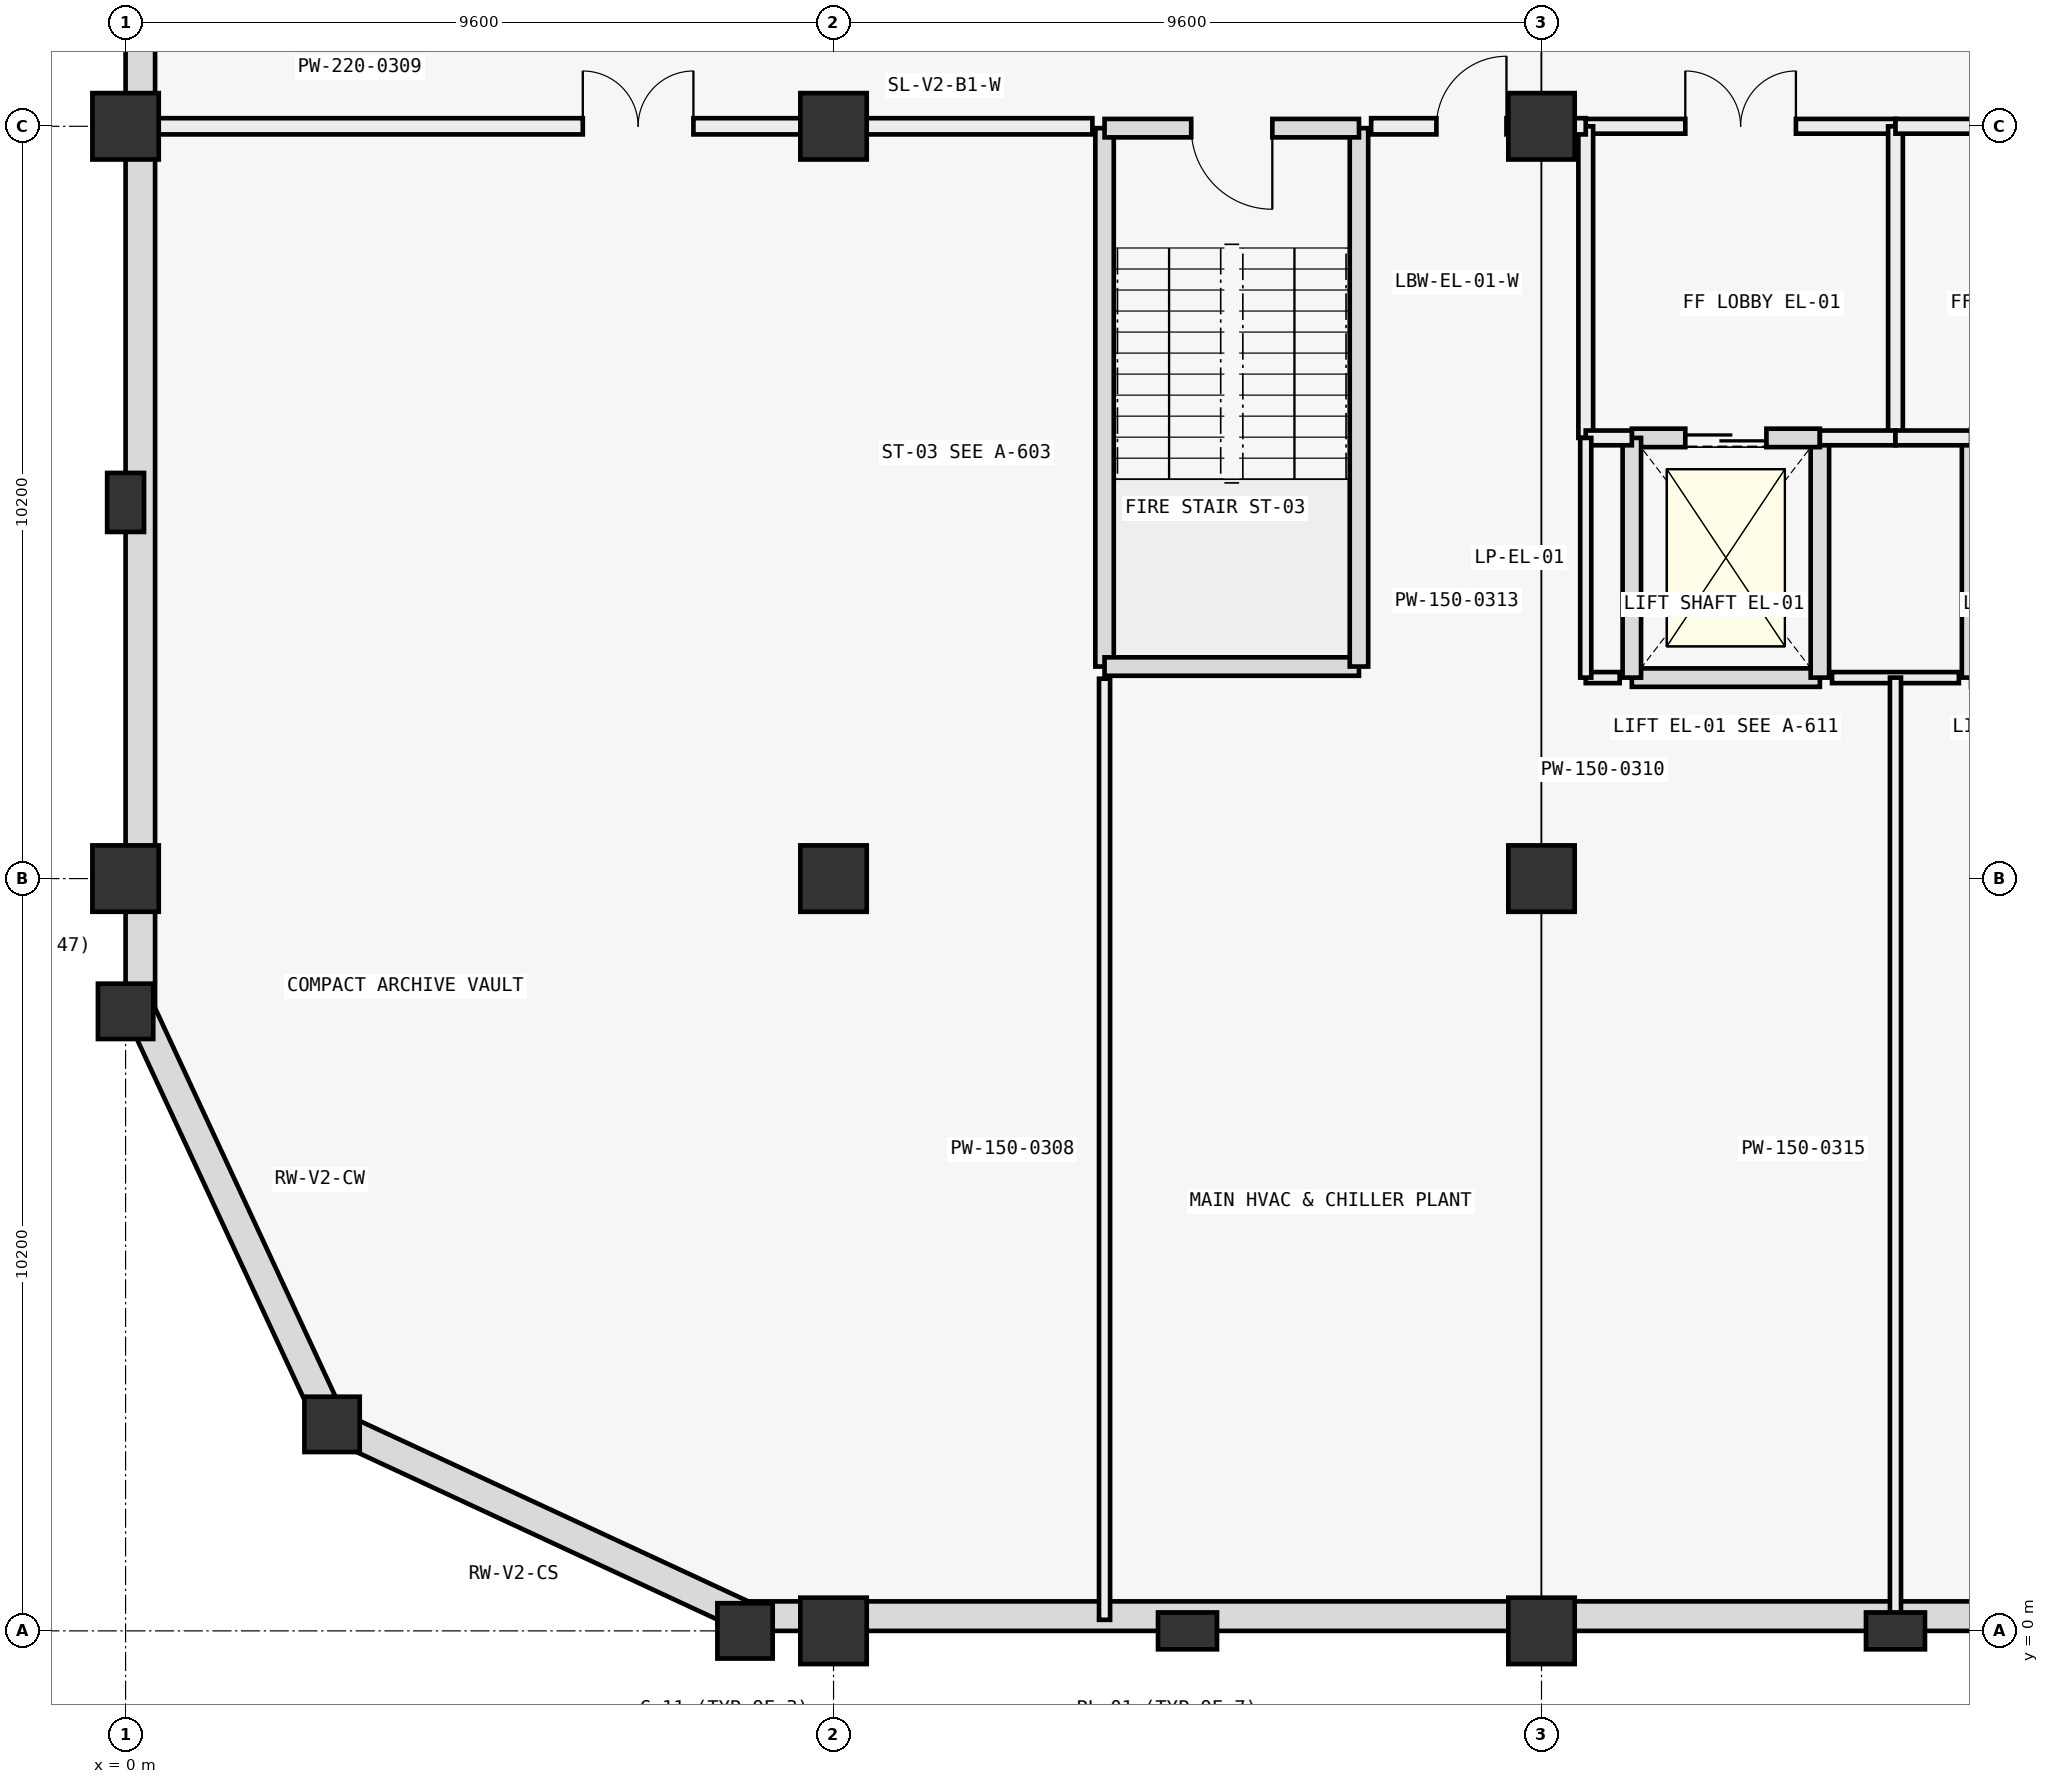
"""IFC4 building model, lengths in metres.
Left out: names, types, materials, properties, quantities, classifications, styles, units other than length and angle.
Written with IfcOpenShell. Run it as: python <this file> out.ifc"""

import sys

from ifc_helpers import new_model, si_unit, direction, frame, frame_2d, origin, origin_2d, place, context, subcontext, project, spatial, rectangle, circle, extrude, element, fill, save


model = new_model("IFC4")
c1 = context("Model", 3, precision=1e-05, world=origin(), true_north=direction((0.0, 1.0)))
c2 = subcontext(c1, "Body", "Model", "MODEL_VIEW")
j1 = project(units=[si_unit("LENGTHUNIT", "METRE"), si_unit("PLANEANGLEUNIT", "RADIAN")], contexts=[c1])
p1 = place(None, origin())
s1 = spatial("IfcSite", under=j1, at=p1, CompositionType="ELEMENT")
p2 = place(p1, origin())
s2 = spatial("IfcBuilding", under=s1, at=p2, CompositionType="ELEMENT")
p3 = place(p2, frame((0.0, 0.0, -4.2)))
s3 = spatial("IfcBuildingStorey", under=s2, at=p3, CompositionType="ELEMENT", Elevation=-4.2)
for number, where, z_axis, x_axis in (
    (1, (0.0, 10.2, 0.0), (0.0, 0.0, 1.0), (1.0, 0.0, 0.0)),
    (2, (0.0, 20.4, 0.0), (0.0, 0.0, 1.0), (1.0, 0.0, 0.0)),
    (3, (9.6, 0.0, 0.0), (0.0, 0.0, 1.0), (1.0, 0.0, 0.0)),
    (4, (9.6, 10.2, 0.0), (0.0, 0.0, 1.0), (1.0, 0.0, 0.0)),
    (5, (9.6, 20.4, 0.0), (0.0, 0.0, 1.0), (1.0, 0.0, 0.0)),
    (6, (19.2, 0.0, 0.0), (0.0, 0.0, 1.0), (1.0, 0.0, 0.0)),
    (7, (19.2, 10.2, 0.0), (0.0, 0.0, 1.0), (1.0, 0.0, 0.0)),
    (8, (19.2, 20.4, 0.0), (0.0, 0.0, 1.0), (1.0, 0.0, 0.0)),
):
    element("IfcColumn", number, at=place(p3, frame(where, z_axis=z_axis, x_axis=x_axis)), inside=s3, PredefinedType="COLUMN", context=c2, shape_type="SweptSolid", body=[
        extrude(rectangle(XDim=0.9, YDim=0.9, at=origin_2d()), origin(), (0.0, 0.0, 1.0), 4.2),
    ])
for number, where, z_axis, x_axis in (
    (9, (8.4, 0.0, 0.0), (0.0, 0.0, 1.0), (0.0, 1.0, 0.0)),
    (10, (2.8, 2.8, 0.0), (0.0, 0.0, 1.0), (0.707, 0.707, 0.0)),
    (11, (0.0, 8.4, 0.0), (0.0, 0.0, 1.0), (1.0, 0.0, 0.0)),
):
    element("IfcColumn", number, at=place(p3, frame(where, z_axis=z_axis, x_axis=x_axis)), inside=s3, PredefinedType="COLUMN", context=c2, shape_type="SweptSolid", body=[
        extrude(circle(Radius=0.375, at=origin_2d()), origin(), (0.0, 0.0, 1.0), 4.2),
    ])
for number, where, z_axis, x_axis in (
    (12, (14.4, 0.0, 0.0), (0.0, 0.0, 1.0), (0.0, 1.0, 0.0)),
    (13, (24.0, 0.0, 0.0), (0.0, 0.0, 1.0), (0.0, 1.0, 0.0)),
    (14, (0.0, 15.3, 0.0), (0.0, 0.0, 1.0), (1.0, 0.0, 0.0)),
):
    element("IfcColumn", number, at=place(p3, frame(where, z_axis=z_axis, x_axis=x_axis)), inside=s3, PredefinedType="PILASTER", context=c2, shape_type="SweptSolid", body=[
        extrude(rectangle(XDim=0.5, YDim=0.8, at=origin_2d()), origin(), (0.0, 0.0, 1.0), 4.2),
    ])
p4 = place(p3, frame((8.4, 0.2, 0.0), z_axis=(0.0, 0.0, 1.0), x_axis=(1.0, 0.0, 0.0)))
e15 = element("IfcWall", 15, at=p4, inside=s3, PredefinedType="USERDEFINED", context=c2, shape_type="SweptSolid", body=[
    extrude(rectangle(XDim=39.4, YDim=0.4, at=frame_2d((19.7, 0.0))), origin(), (0.0, 0.0, 1.0), 3.9),
])
for number, where, z_axis, x_axis in (
    (16, (8.4, 0.2, 0.0), (0.0, 0.0, 1.0), (-0.907, 0.421, 0.0)),
    (17, (2.8, 2.8, 0.0), (0.0, 0.0, 1.0), (-0.421, 0.907, 0.0)),
):
    element("IfcWall", number, at=place(p3, frame(where, z_axis=z_axis, x_axis=x_axis)), inside=s3, PredefinedType="USERDEFINED", context=c2, shape_type="SweptSolid", body=[
        extrude(rectangle(XDim=6.174, YDim=0.4, at=frame_2d((3.087, 0.0))), origin(), (0.0, 0.0, 1.0), 3.9),
    ])
p5 = place(p3, frame((0.2, 8.4, 0.0), z_axis=(0.0, 0.0, 1.0), x_axis=(0.0, 1.0, 0.0)))
e18 = element("IfcWall", 18, at=p5, inside=s3, PredefinedType="USERDEFINED", context=c2, shape_type="SweptSolid", body=[
    extrude(rectangle(XDim=32.2, YDim=0.4, at=frame_2d((16.1, 0.0))), origin(), (0.0, 0.0, 1.0), 3.9),
])
p6 = place(p3, frame((13.275, 20.375, 0.0), z_axis=(0.0, 0.0, 1.0), x_axis=(0.0, -1.0, 0.0)))
e19 = element("IfcWall", 19, at=p6, inside=s3, PredefinedType="SOLIDWALL", context=c2, shape_type="SweptSolid", body=[
    extrude(rectangle(XDim=7.3, YDim=0.25, at=frame_2d((3.65, 0.0))), origin(), (0.0, 0.0, 1.0), 3.9),
])
p7 = place(p3, frame((13.275, 13.075, 0.0), z_axis=(0.0, 0.0, 1.0), x_axis=(1.0, 0.0, 0.0)))
e20 = element("IfcWall", 20, at=p7, inside=s3, PredefinedType="SOLIDWALL", context=c2, shape_type="SweptSolid", body=[
    extrude(rectangle(XDim=3.45, YDim=0.25, at=frame_2d((1.725, 0.0))), origin(), (0.0, 0.0, 1.0), 3.9),
])
p8 = place(p3, frame((16.725, 13.075, 0.0), z_axis=(0.0, 0.0, 1.0), x_axis=(0.0, 1.0, 0.0)))
e21 = element("IfcWall", 21, at=p8, inside=s3, PredefinedType="SOLIDWALL", context=c2, shape_type="SweptSolid", body=[
    extrude(rectangle(XDim=7.3, YDim=0.25, at=frame_2d((3.65, 0.0))), origin(), (0.0, 0.0, 1.0), 3.9),
])
p9 = place(p3, frame((16.725, 20.375, 0.0), z_axis=(0.0, 0.0, 1.0), x_axis=(-1.0, 0.0, 0.0)))
e22 = element("IfcWall", 22, at=p9, inside=s3, PredefinedType="SOLIDWALL", context=c2, shape_type="SweptSolid", body=[
    extrude(rectangle(XDim=3.45, YDim=0.25, at=frame_2d((1.725, 0.0))), origin(), (0.0, 0.0, 1.0), 3.9),
])
p10 = place(p9, frame((1.175, 0.0, 0.0)))
e23 = element("IfcOpeningElement", 23, at=p10, cuts=e22, PredefinedType="OPENING", context=c2, shape_type="SweptSolid", body=[
    extrude(rectangle(XDim=1.1, YDim=2.2, at=frame_2d((0.55, 1.1))), frame((0.0, 0.135, 0.0), z_axis=(0.0, -1.0, 0.0), x_axis=(1.0, 0.0, 0.0)), (0.0, 0.0, 1.0), 0.27),
])
p11 = place(p3, frame((20.425, 12.925, -0.15), z_axis=(0.0, 0.0, 1.0), x_axis=(1.0, 0.0, 0.0)))
e24 = element("IfcWall", 24, at=p11, inside=s3, PredefinedType="SOLIDWALL", context=c2, shape_type="SweptSolid", body=[
    extrude(rectangle(XDim=2.55, YDim=0.25, at=frame_2d((1.275, 0.0))), origin(), (0.0, 0.0, 1.0), 4.05),
])
p12 = place(p3, frame((22.975, 12.925, -0.15), z_axis=(0.0, 0.0, 1.0), x_axis=(0.0, 1.0, 0.0)))
e25 = element("IfcWall", 25, at=p12, inside=s3, PredefinedType="SOLIDWALL", context=c2, shape_type="SweptSolid", body=[
    extrude(rectangle(XDim=3.25, YDim=0.25, at=frame_2d((1.625, 0.0))), origin(), (0.0, 0.0, 1.0), 4.05),
])
p13 = place(p3, frame((22.975, 16.175, -0.15), z_axis=(0.0, 0.0, 1.0), x_axis=(-1.0, 0.0, 0.0)))
e26 = element("IfcWall", 26, at=p13, inside=s3, PredefinedType="SOLIDWALL", context=c2, shape_type="SweptSolid", body=[
    extrude(rectangle(XDim=2.55, YDim=0.25, at=frame_2d((1.275, 0.0))), origin(), (0.0, 0.0, 1.0), 4.05),
])
p14 = place(p13, frame((0.725, 0.0, 0.15)))
e27 = element("IfcOpeningElement", 27, at=p14, cuts=e26, PredefinedType="OPENING", context=c2, shape_type="SweptSolid", body=[
    extrude(rectangle(XDim=1.1, YDim=2.1, at=frame_2d((0.55, 1.05))), frame((0.0, 0.135, 0.0), z_axis=(0.0, -1.0, 0.0), x_axis=(1.0, 0.0, 0.0)), (0.0, 0.0, 1.0), 0.27),
])
p15 = place(p3, frame((20.425, 16.175, -0.15), z_axis=(0.0, 0.0, 1.0), x_axis=(0.0, -1.0, 0.0)))
e28 = element("IfcWall", 28, at=p15, inside=s3, PredefinedType="SOLIDWALL", context=c2, shape_type="SweptSolid", body=[
    extrude(rectangle(XDim=3.25, YDim=0.25, at=frame_2d((1.625, 0.0))), origin(), (0.0, 0.0, 1.0), 4.05),
])
p16 = place(p3, frame((19.8, 20.4, 0.0), z_axis=(0.0, 0.0, 1.0), x_axis=(1.0, 0.0, 0.0)))
e29 = element("IfcWall", 29, at=p16, inside=s3, PredefinedType="PARTITIONING", context=c2, shape_type="SweptSolid", body=[
    extrude(rectangle(XDim=4.2, YDim=0.2, at=frame_2d((2.1, 0.0))), origin(), (0.0, 0.0, 1.0), 3.18),
])
p17 = place(p16, frame((1.35, 0.0, 0.0)))
e30 = element("IfcOpeningElement", 30, at=p17, cuts=e29, PredefinedType="OPENING", context=c2, shape_type="SweptSolid", body=[
    extrude(rectangle(XDim=1.5, YDim=2.2, at=frame_2d((0.75, 1.1))), frame((0.0, 0.11, 0.0), z_axis=(0.0, -1.0, 0.0), x_axis=(1.0, 0.0, 0.0)), (0.0, 0.0, 1.0), 0.22),
])
for number, where, z_axis, x_axis in (
    (31, (19.8, 16.175, 0.0), (0.0, 0.0, 1.0), (0.0, 1.0, 0.0)),
    (32, (24.0, 16.175, 0.0), (0.0, 0.0, 1.0), (0.0, 1.0, 0.0)),
):
    element("IfcWall", number, at=place(p3, frame(where, z_axis=z_axis, x_axis=x_axis)), inside=s3, PredefinedType="PARTITIONING", context=c2, shape_type="SweptSolid", body=[
        extrude(rectangle(XDim=4.225, YDim=0.2, at=frame_2d((2.112, 0.0))), origin(), (0.0, 0.0, 1.0), 3.18),
    ])
p18 = place(p3, frame((19.8, 16.175, 0.0), z_axis=(0.0, 0.0, 1.0), x_axis=(1.0, 0.0, 0.0)))
e33 = element("IfcWall", 33, at=p18, inside=s3, PredefinedType="PARTITIONING", context=c2, shape_type="SweptSolid", body=[
    extrude(rectangle(XDim=0.625, YDim=0.2, at=frame_2d((0.312, 0.0))), origin(), (0.0, 0.0, 1.0), 3.55),
])
p19 = place(p3, frame((22.975, 16.175, 0.0), z_axis=(0.0, 0.0, 1.0), x_axis=(1.0, 0.0, 0.0)))
e34 = element("IfcWall", 34, at=p19, inside=s3, PredefinedType="PARTITIONING", context=c2, shape_type="SweptSolid", body=[
    extrude(rectangle(XDim=1.025, YDim=0.2, at=frame_2d((0.512, 0.0))), origin(), (0.0, 0.0, 1.0), 3.55),
])
p20 = place(p3, frame((25.025, 16.175, -0.15), z_axis=(0.0, 0.0, 1.0), x_axis=(0.0, -1.0, 0.0)))
e35 = element("IfcWall", 35, at=p20, inside=s3, PredefinedType="SOLIDWALL", context=c2, shape_type="SweptSolid", body=[
    extrude(rectangle(XDim=3.25, YDim=0.25, at=frame_2d((1.625, 0.0))), origin(), (0.0, 0.0, 1.0), 4.05),
])
p21 = place(p3, frame((24.0, 20.4, 0.0), z_axis=(0.0, 0.0, 1.0), x_axis=(1.0, 0.0, 0.0)))
e36 = element("IfcWall", 36, at=p21, inside=s3, PredefinedType="PARTITIONING", context=c2, shape_type="SweptSolid", body=[
    extrude(rectangle(XDim=4.2, YDim=0.2, at=frame_2d((2.1, 0.0))), origin(), (0.0, 0.0, 1.0), 3.18),
])
p22 = place(p21, frame((1.35, 0.0, 0.0)))
e37 = element("IfcOpeningElement", 37, at=p22, cuts=e36, PredefinedType="OPENING", context=c2, shape_type="SweptSolid", body=[
    extrude(rectangle(XDim=1.5, YDim=2.2, at=frame_2d((0.75, 1.1))), frame((0.0, 0.11, 0.0), z_axis=(0.0, -1.0, 0.0), x_axis=(1.0, 0.0, 0.0)), (0.0, 0.0, 1.0), 0.22),
])
p23 = place(p3, frame((24.0, 16.175, 0.0), z_axis=(0.0, 0.0, 1.0), x_axis=(1.0, 0.0, 0.0)))
e38 = element("IfcWall", 38, at=p23, inside=s3, PredefinedType="PARTITIONING", context=c2, shape_type="SweptSolid", body=[
    extrude(rectangle(XDim=1.025, YDim=0.2, at=frame_2d((0.512, 0.0))), origin(), (0.0, 0.0, 1.0), 3.55),
])
p24 = place(p3, frame((13.275, 0.15, 0.0), z_axis=(0.0, 0.0, 1.0), x_axis=(0.0, 1.0, 0.0)))
e39 = element("IfcWall", 39, at=p24, inside=s3, PredefinedType="PARTITIONING", context=c2, shape_type="SweptSolid", body=[
    extrude(rectangle(XDim=12.76, YDim=0.15, at=frame_2d((6.38, 0.0))), origin(), (0.0, 0.0, 1.0), 3.18),
])
p25 = place(p3, frame((0.15, 20.4, 0.0), z_axis=(0.0, 0.0, 1.0), x_axis=(1.0, 0.0, 0.0)))
e40 = element("IfcWall", 40, at=p25, inside=s3, PredefinedType="PARTITIONING", context=c2, shape_type="SweptSolid", body=[
    extrude(rectangle(XDim=12.96, YDim=0.22, at=frame_2d((6.48, 0.0))), origin(), (0.0, 0.0, 1.0), 3.18),
])
p26 = place(p25, frame((6.05, 0.0, 0.0)))
e41 = element("IfcOpeningElement", 41, at=p26, cuts=e40, PredefinedType="OPENING", context=c2, shape_type="SweptSolid", body=[
    extrude(rectangle(XDim=1.5, YDim=2.2, at=frame_2d((0.75, 1.1))), frame((0.0, 0.12, 0.0), z_axis=(0.0, -1.0, 0.0), x_axis=(1.0, 0.0, 0.0)), (0.0, 0.0, 1.0), 0.24),
])
p27 = place(p3, frame((19.8, 12.925, 0.0), z_axis=(0.0, 0.0, 1.0), x_axis=(1.0, 0.0, 0.0)))
e42 = element("IfcWall", 42, at=p27, inside=s3, PredefinedType="PARTITIONING", context=c2, shape_type="SweptSolid", body=[
    extrude(rectangle(XDim=0.46, YDim=0.15, at=frame_2d((0.23, 0.0))), origin(), (0.0, 0.0, 1.0), 3.85),
])
p28 = place(p3, frame((23.14, 12.925, 0.0), z_axis=(0.0, 0.0, 1.0), x_axis=(1.0, 0.0, 0.0)))
e43 = element("IfcWall", 43, at=p28, inside=s3, PredefinedType="PARTITIONING", context=c2, shape_type="SweptSolid", body=[
    extrude(rectangle(XDim=1.72, YDim=0.15, at=frame_2d((0.86, 0.0))), origin(), (0.0, 0.0, 1.0), 3.85),
])
p29 = place(p3, frame((19.8, 12.925, 0.0), z_axis=(0.0, 0.0, 1.0), x_axis=(0.0, 1.0, 0.0)))
e44 = element("IfcWall", 44, at=p29, inside=s3, PredefinedType="PARTITIONING", context=c2, shape_type="SweptSolid", body=[
    extrude(rectangle(XDim=3.25, YDim=0.15, at=frame_2d((1.625, 0.0))), origin(), (0.0, 0.0, 1.0), 3.85),
])
p30 = place(p3, frame((16.89, 20.4, 0.0), z_axis=(0.0, 0.0, 1.0), x_axis=(1.0, 0.0, 0.0)))
e45 = element("IfcWall", 45, at=p30, inside=s3, PredefinedType="PARTITIONING", context=c2, shape_type="SweptSolid", body=[
    extrude(rectangle(XDim=2.91, YDim=0.22, at=frame_2d((1.455, 0.0))), origin(), (0.0, 0.0, 1.0), 3.18),
])
p31 = place(p30, frame((0.885, 0.0, 0.0)))
e46 = element("IfcOpeningElement", 46, at=p31, cuts=e45, PredefinedType="OPENING", context=c2, shape_type="SweptSolid", body=[
    extrude(rectangle(XDim=0.95, YDim=2.1, at=frame_2d((0.475, 1.05))), frame((0.0, 0.12, 0.0), z_axis=(0.0, -1.0, 0.0), x_axis=(1.0, 0.0, 0.0)), (0.0, 0.0, 1.0), 0.24),
])
p32 = place(p3, frame((24.0, 0.15, 0.0), z_axis=(0.0, 0.0, 1.0), x_axis=(0.0, 1.0, 0.0)))
e47 = element("IfcWall", 47, at=p32, inside=s3, PredefinedType="PARTITIONING", context=c2, shape_type="SweptSolid", body=[
    extrude(rectangle(XDim=12.775, YDim=0.15, at=frame_2d((6.388, 0.0))), origin(), (0.0, 0.0, 1.0), 3.18),
])
p33 = place(p10, origin())
e48 = element("IfcDoor", 48, at=p33, inside=s3, OperationType="SINGLE_SWING_LEFT", PredefinedType="DOOR", context=c2, shape_type="SweptSolid", body=[
    extrude(rectangle(XDim=1.1, YDim=2.2, at=frame_2d((0.55, 1.1))), frame((0.0, 0.025, 0.0), z_axis=(0.0, -1.0, 0.0), x_axis=(1.0, 0.0, 0.0)), (0.0, 0.0, 1.0), 0.05),
])
fill(e23, e48)
p34 = place(p14, origin())
e49 = element("IfcDoor", 49, at=p34, inside=s3, OperationType="SLIDING_TO_LEFT", PredefinedType="DOOR", context=c2, shape_type="SweptSolid", body=[
    extrude(rectangle(XDim=1.1, YDim=2.1, at=frame_2d((0.55, 1.05))), frame((0.0, 0.025, 0.0), z_axis=(0.0, -1.0, 0.0), x_axis=(1.0, 0.0, 0.0)), (0.0, 0.0, 1.0), 0.05),
])
fill(e27, e49)
p35 = place(p17, origin())
e50 = element("IfcDoor", 50, at=p35, inside=s3, OperationType="SINGLE_SWING_LEFT", PredefinedType="DOOR", context=c2, shape_type="SweptSolid", body=[
    extrude(rectangle(XDim=1.5, YDim=2.2, at=frame_2d((0.75, 1.1))), frame((0.0, 0.025, 0.0), z_axis=(0.0, -1.0, 0.0), x_axis=(1.0, 0.0, 0.0)), (0.0, 0.0, 1.0), 0.05),
])
fill(e30, e50)
p36 = place(p26, origin())
e51 = element("IfcDoor", 51, at=p36, inside=s3, OperationType="DOUBLE_DOOR_SINGLE_SWING", PredefinedType="DOOR", context=c2, shape_type="SweptSolid", body=[
    extrude(rectangle(XDim=1.5, YDim=2.2, at=frame_2d((0.75, 1.1))), frame((0.0, 0.025, 0.0), z_axis=(0.0, -1.0, 0.0), x_axis=(1.0, 0.0, 0.0)), (0.0, 0.0, 1.0), 0.05),
])
fill(e41, e51)
p37 = place(p31, origin())
e52 = element("IfcDoor", 52, at=p37, inside=s3, OperationType="SINGLE_SWING_RIGHT", PredefinedType="DOOR", context=c2, shape_type="SweptSolid", body=[
    extrude(rectangle(XDim=0.95, YDim=2.1, at=frame_2d((0.475, 1.05))), frame((0.0, 0.025, 0.0), z_axis=(0.0, -1.0, 0.0), x_axis=(1.0, 0.0, 0.0)), (0.0, 0.0, 1.0), 0.05),
])
fill(e46, e52)
save(model, sys.argv[1])
